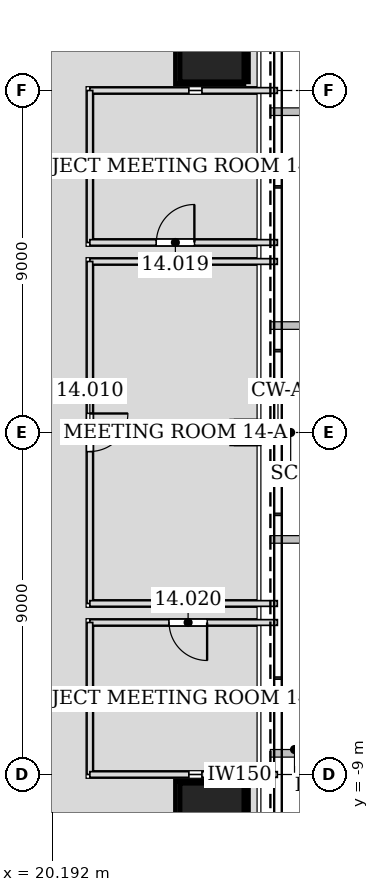
"""IFC4 building model, lengths in metres.
Left out: names, types, materials, properties, quantities, classifications, styles, units other than length and angle.
Written with IfcOpenShell. Run it as: python <this file> out.ifc"""

import sys

from ifc_helpers import new_model, si_unit, direction, frame, frame_2d, origin, origin_2d, place, context, subcontext, project, spatial, rectangle, hollow_rectangle, extrude, element, fill, save


model = new_model("IFC4")
c1 = context("Model", 3, precision=1e-05, world=origin(), true_north=direction((0.0, 1.0)))
c2 = subcontext(c1, "Body", "Model", "MODEL_VIEW")
j1 = project(units=[si_unit("LENGTHUNIT", "METRE"), si_unit("PLANEANGLEUNIT", "RADIAN")], contexts=[c1])
p1 = place(None, origin())
s1 = spatial("IfcSite", under=j1, at=p1, CompositionType="ELEMENT")
p2 = place(p1, origin())
s2 = spatial("IfcBuilding", under=s1, at=p2, CompositionType="ELEMENT")
p3 = place(p2, frame((0.0, 0.0, 66.6)))
s3 = spatial("IfcBuildingStorey", under=s2, at=p3, CompositionType="ELEMENT", Elevation=66.6)
for number, where, z_axis, x_axis in (
    (1, (24.452, 10.129, 0.0), (-0.028, -0.012, 1.0), (0.384, -0.923, 0.0)),
    (2, (24.452, -10.129, 0.0), (-0.028, 0.012, 1.0), (-0.384, -0.923, 0.0)),
):
    element("IfcColumn", number, at=place(p3, frame(where, z_axis=z_axis, x_axis=x_axis)), inside=s3, PredefinedType="COLUMN", context=c2, shape_type="SweptSolid", body=[
        extrude(hollow_rectangle(XDim=1.8, YDim=1.8, WallThickness=0.085, at=origin_2d()), origin(), (0.0, 0.0, 1.0), 4.202),
    ])
p4 = place(p3, frame((25.331, 0.0, 0.0), z_axis=(-0.028297679255, 0.0, 0.99959954049), x_axis=(0.0, -1.0, 0.0)))
e3 = element("IfcColumn", 3, at=p4, inside=s3, PredefinedType="COLUMN", context=c2, shape_type="SweptSolid", body=[
    extrude(hollow_rectangle(XDim=0.6, YDim=0.6, WallThickness=0.032, at=origin_2d()), origin(), (0.0, 0.0, 1.0), 4.202),
])
p5 = place(p3, frame((26.113, 4.5, 0.0), z_axis=(0.0, 0.0, 1.0), x_axis=(-1.0, 0.0, 0.0)))
e4 = element("IfcWall", 4, at=p5, inside=s3, PredefinedType="PARTITIONING", context=c2, shape_type="SweptSolid", body=[
    extrude(rectangle(XDim=4.932, YDim=0.15, at=frame_2d((2.466, 0.0))), origin(), (0.0, 0.0, 1.0), 3.423),
])
p6 = place(p3, frame((21.181, 4.5, 0.0), z_axis=(0.0, 0.0, 1.0), x_axis=(0.0, -1.0, 0.0)))
e5 = element("IfcWall", 5, at=p6, inside=s3, PredefinedType="PARTITIONING", context=c2, shape_type="SweptSolid", body=[
    extrude(rectangle(XDim=9.0, YDim=0.15, at=frame_2d((4.5, 0.0))), origin(), (0.0, 0.0, 1.0), 3.065),
])
p7 = place(p6, frame((4.0, 0.0, 0.0)))
e6 = element("IfcOpeningElement", 6, at=p7, cuts=e5, PredefinedType="OPENING", context=c2, shape_type="SweptSolid", body=[
    extrude(rectangle(XDim=1.0, YDim=2.1, at=frame_2d((0.5, 1.05))), frame((0.0, 0.085, 0.0), z_axis=(0.0, -1.0, 0.0), x_axis=(1.0, 0.0, 0.0)), (0.0, 0.0, 1.0), 0.17),
])
p8 = place(p3, frame((21.181, -4.5, 0.0), z_axis=(0.0, 0.0, 1.0), x_axis=(1.0, 0.0, 0.0)))
e7 = element("IfcWall", 7, at=p8, inside=s3, PredefinedType="PARTITIONING", context=c2, shape_type="SweptSolid", body=[
    extrude(rectangle(XDim=4.932, YDim=0.15, at=frame_2d((2.466, 0.0))), origin(), (0.0, 0.0, 1.0), 3.423),
])
p9 = place(p3, frame((26.113, 9.0, 0.0), z_axis=(0.0, 0.0, 1.0), x_axis=(-1.0, 0.0, 0.0)))
e8 = element("IfcWall", 8, at=p9, inside=s3, PredefinedType="PARTITIONING", context=c2, shape_type="SweptSolid", body=[
    extrude(rectangle(XDim=1.983, YDim=0.15, at=frame_2d((0.992, 0.0))), origin(), (0.0, 0.0, 1.0), 3.497),
])
p10 = place(p3, frame((23.786, 9.0, 0.0), z_axis=(0.0, 0.0, 1.0), x_axis=(-1.0, 0.0, 0.0)))
e9 = element("IfcWall", 9, at=p10, inside=s3, PredefinedType="PARTITIONING", context=c2, shape_type="SweptSolid", body=[
    extrude(rectangle(XDim=2.605, YDim=0.15, at=frame_2d((1.302, 0.0))), origin(), (0.0, 0.0, 1.0), 3.423),
])
p11 = place(p3, frame((21.181, 9.0, 0.0), z_axis=(0.0, 0.0, 1.0), x_axis=(0.0, -1.0, 0.0)))
e10 = element("IfcWall", 10, at=p11, inside=s3, PredefinedType="PARTITIONING", context=c2, shape_type="SweptSolid", body=[
    extrude(rectangle(XDim=4.0, YDim=0.15, at=frame_2d((2.0, 0.0))), origin(), (0.0, 0.0, 1.0), 4.035),
])
p12 = place(p3, frame((21.181, 5.0, 0.0), z_axis=(0.0, 0.0, 1.0), x_axis=(1.0, 0.0, 0.0)))
e11 = element("IfcWall", 11, at=p12, inside=s3, PredefinedType="PARTITIONING", context=c2, shape_type="SweptSolid", body=[
    extrude(rectangle(XDim=4.934, YDim=0.15, at=frame_2d((2.467, 0.0))), origin(), (0.0, 0.0, 1.0), 3.423),
])
p13 = place(p12, frame((1.75, 0.0, 0.0)))
e12 = element("IfcOpeningElement", 12, at=p13, cuts=e11, PredefinedType="OPENING", context=c2, shape_type="SweptSolid", body=[
    extrude(rectangle(XDim=1.0, YDim=2.1, at=frame_2d((0.5, 1.05))), frame((0.0, 0.085, 0.0), z_axis=(0.0, -1.0, 0.0), x_axis=(1.0, 0.0, 0.0)), (0.0, 0.0, 1.0), 0.17),
])
p14 = place(p3, frame((26.115, -5.0, 0.0), z_axis=(0.0, 0.0, 1.0), x_axis=(-1.0, 0.0, 0.0)))
e13 = element("IfcWall", 13, at=p14, inside=s3, PredefinedType="PARTITIONING", context=c2, shape_type="SweptSolid", body=[
    extrude(rectangle(XDim=4.934, YDim=0.15, at=frame_2d((2.467, 0.0))), origin(), (0.0, 0.0, 1.0), 3.423),
])
p15 = place(p14, frame((1.849, 0.0, 0.0)))
e14 = element("IfcOpeningElement", 14, at=p15, cuts=e13, PredefinedType="OPENING", context=c2, shape_type="SweptSolid", body=[
    extrude(rectangle(XDim=1.0, YDim=2.1, at=frame_2d((0.5, 1.05))), frame((0.0, 0.085, 0.0), z_axis=(0.0, -1.0, 0.0), x_axis=(1.0, 0.0, 0.0)), (0.0, 0.0, 1.0), 0.17),
])
p16 = place(p3, frame((21.181, -5.0, 0.0), z_axis=(0.0, 0.0, 1.0), x_axis=(0.0, -1.0, 0.0)))
e15 = element("IfcWall", 15, at=p16, inside=s3, PredefinedType="PARTITIONING", context=c2, shape_type="SweptSolid", body=[
    extrude(rectangle(XDim=4.0, YDim=0.15, at=frame_2d((2.0, 0.0))), origin(), (0.0, 0.0, 1.0), 4.035),
])
p17 = place(p3, frame((21.181, -9.0, 0.0), z_axis=(0.0, 0.0, 1.0), x_axis=(1.0, 0.0, 0.0)))
e16 = element("IfcWall", 16, at=p17, inside=s3, PredefinedType="PARTITIONING", context=c2, shape_type="SweptSolid", body=[
    extrude(rectangle(XDim=2.605, YDim=0.15, at=frame_2d((1.302, 0.0))), origin(), (0.0, 0.0, 1.0), 3.423),
])
p18 = place(p3, frame((24.129, -9.0, 0.0), z_axis=(0.0, 0.0, 1.0), x_axis=(1.0, 0.0, 0.0)))
e17 = element("IfcWall", 17, at=p18, inside=s3, PredefinedType="PARTITIONING", context=c2, shape_type="SweptSolid", body=[
    extrude(rectangle(XDim=1.983, YDim=0.15, at=frame_2d((0.992, 0.0))), origin(), (0.0, 0.0, 1.0), 3.497),
])
p19 = place(p7, origin())
e18 = element("IfcDoor", 18, at=p19, inside=s3, OperationType="SINGLE_SWING_LEFT", PredefinedType="DOOR", context=c2, shape_type="SweptSolid", body=[
    extrude(rectangle(XDim=1.0, YDim=2.1, at=frame_2d((0.5, 1.05))), frame((0.0, 0.025, 0.0), z_axis=(0.0, -1.0, 0.0), x_axis=(1.0, 0.0, 0.0)), (0.0, 0.0, 1.0), 0.05),
])
fill(e6, e18)
p20 = place(p13, origin())
e19 = element("IfcDoor", 19, at=p20, inside=s3, OperationType="SINGLE_SWING_RIGHT", PredefinedType="DOOR", context=c2, shape_type="SweptSolid", body=[
    extrude(rectangle(XDim=1.0, YDim=2.1, at=frame_2d((0.5, 1.05))), frame((0.0, 0.025, 0.0), z_axis=(0.0, -1.0, 0.0), x_axis=(1.0, 0.0, 0.0)), (0.0, 0.0, 1.0), 0.05),
])
fill(e12, e19)
p21 = place(p15, origin())
e20 = element("IfcDoor", 20, at=p21, inside=s3, OperationType="SINGLE_SWING_LEFT", PredefinedType="DOOR", context=c2, shape_type="SweptSolid", body=[
    extrude(rectangle(XDim=1.0, YDim=2.1, at=frame_2d((0.5, 1.05))), frame((0.0, 0.025, 0.0), z_axis=(0.0, -1.0, 0.0), x_axis=(1.0, 0.0, 0.0)), (0.0, 0.0, 1.0), 0.05),
])
fill(e14, e20)
save(model, sys.argv[1])
